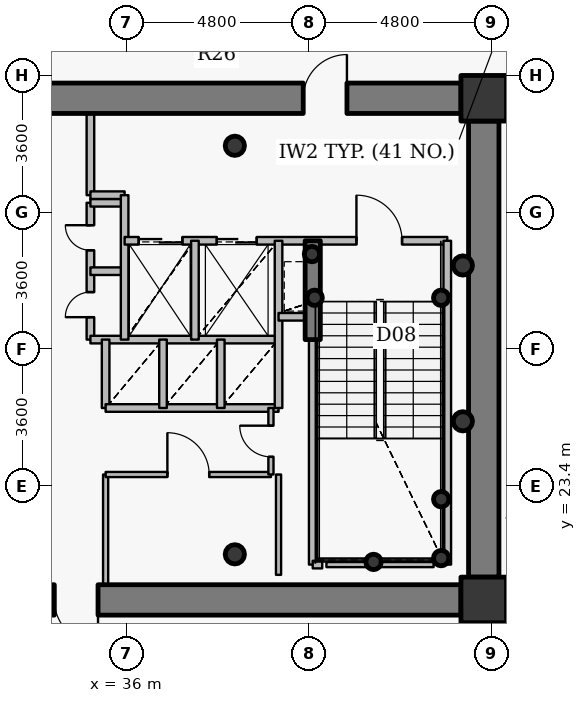
"""IFC4 building model, lengths in metres.
Left out: names, types, materials, properties, quantities, classifications, styles, units other than length and angle.
Written with IfcOpenShell. Run it as: python <this file> out.ifc"""

import sys

from ifc_helpers import new_model, si_unit, direction, frame, frame_2d, origin, origin_2d, place, context, subcontext, project, spatial, rectangle, hollow_circle, extrude, source, transform, mapped, element, fill, save


model = new_model("IFC4")
c1 = context("Model", 3, precision=1e-05, world=origin(), true_north=direction((0.0, 1.0)))
c2 = subcontext(c1, "Body", "Model", "MODEL_VIEW")
j1 = project(units=[si_unit("LENGTHUNIT", "METRE"), si_unit("PLANEANGLEUNIT", "RADIAN")], contexts=[c1])
p1 = place(None, origin())
s1 = spatial("IfcSite", under=j1, at=p1, CompositionType="ELEMENT")
p2 = place(p1, origin())
s2 = spatial("IfcBuilding", under=s1, at=p2, CompositionType="ELEMENT")
p3 = place(p2, frame((0.0, 0.0, 174.9)))
s3 = spatial("IfcBuildingStorey", under=s2, at=p3, CompositionType="ELEMENT", Elevation=174.9)
for number, where, z_axis, x_axis in (
    (1, (45.4, 20.4, 0.0), (0.0, 0.0, 1.0), (1.0, 0.0, 0.0)),
    (2, (45.4, 33.6, 0.0), (0.0, 0.0, 1.0), (1.0, 0.0, 0.0)),
):
    element("IfcColumn", number, at=place(p3, frame(where, z_axis=z_axis, x_axis=x_axis)), inside=s3, PredefinedType="COLUMN", context=c2, shape_type="SweptSolid", body=[
        extrude(rectangle(XDim=1.2, YDim=1.2, at=origin_2d()), origin(), (0.0, 0.0, 1.0), 3.75),
    ])
for number, where, z_axis, x_axis in (
    (3, (38.85, 21.6, 0.0), (0.0, 0.0, 1.0), (1.0, 0.0, 0.0)),
    (4, (38.85, 32.35, 0.0), (0.0, 0.0, 1.0), (1.0, 0.0, 0.0)),
):
    element("IfcColumn", number, at=place(p3, frame(where, z_axis=z_axis, x_axis=x_axis)), inside=s3, PredefinedType="COLUMN", context=c2, shape_type="SweptSolid", body=[
        extrude(hollow_circle(Radius=0.254, WallThickness=0.02, at=origin_2d()), origin(), (0.0, 0.0, 1.0), 3.75),
    ])
for number, where, z_axis, x_axis in (
    (5, (44.28, 21.5, 0.0), (0.0, 0.0, 1.0), (1.0, 0.0, 0.0)),
    (6, (44.28, 23.05, 0.0), (0.0, 0.0, 1.0), (1.0, 0.0, 0.0)),
    (7, (42.5, 21.4, 0.0), (0.0, 0.0, 1.0), (1.0, 0.0, 0.0)),
    (8, (40.95, 28.35, 0.0), (0.0, 0.0, 1.0), (1.0, 0.0, 0.0)),
    (9, (44.28, 28.35, 0.0), (0.0, 0.0, 1.0), (1.0, 0.0, 0.0)),
    (10, (40.88, 29.5, 0.0), (0.0, 0.0, 1.0), (1.0, 0.0, 0.0)),
):
    element("IfcColumn", number, at=place(p3, frame(where, z_axis=z_axis, x_axis=x_axis)), inside=s3, PredefinedType="COLUMN", context=c2, shape_type="SweptSolid", body=[
        extrude(hollow_circle(Radius=0.203, WallThickness=0.016, at=origin_2d()), origin(), (0.0, 0.0, 1.0), 3.75),
    ])
p4 = place(p3, frame((27.2, 33.6, 0.0), z_axis=(0.0, 0.0, 1.0), x_axis=(1.0, 0.0, 0.0)))
e11 = element("IfcWall", 11, at=p4, inside=s3, PredefinedType="SHEAR", context=c2, shape_type="SweptSolid", body=[
    extrude(rectangle(XDim=17.6, YDim=0.8, at=frame_2d((8.8, 0.0))), origin(), (0.0, 0.0, 1.0), 2.95),
])
p5 = place(p4, frame((13.45, 0.0, 0.0)))
e12 = element("IfcOpeningElement", 12, at=p5, cuts=e11, PredefinedType="OPENING", context=c2, shape_type="SweptSolid", body=[
    extrude(rectangle(XDim=1.15, YDim=2.15, at=origin_2d()), frame((0.575, 0.41, 1.075), z_axis=(0.0, -1.0, 0.0), x_axis=(1.0, 0.0, 0.0)), (0.0, 0.0, 1.0), 0.82),
])
p6 = place(p3, frame((45.4, 33.0, 0.0), z_axis=(0.0, 0.0, 1.0), x_axis=(0.0, -1.0, 0.0)))
e13 = element("IfcWall", 13, at=p6, inside=s3, PredefinedType="SHEAR", context=c2, shape_type="SweptSolid", body=[
    extrude(rectangle(XDim=12.0, YDim=0.8, at=frame_2d((6.0, 0.0))), origin(), (0.0, 0.0, 1.0), 2.95),
])
p7 = place(p3, frame((44.8, 20.4, 0.0), z_axis=(0.0, 0.0, 1.0), x_axis=(-1.0, 0.0, 0.0)))
e14 = element("IfcWall", 14, at=p7, inside=s3, PredefinedType="SHEAR", context=c2, shape_type="SweptSolid", body=[
    extrude(rectangle(XDim=17.6, YDim=0.8, at=frame_2d((8.8, 0.0))), origin(), (0.0, 0.0, 1.0), 2.95),
])
p8 = place(p7, frame((9.55, 0.0, 0.0)))
e15 = element("IfcOpeningElement", 15, at=p8, cuts=e14, PredefinedType="OPENING", context=c2, shape_type="SweptSolid", body=[
    extrude(rectangle(XDim=1.15, YDim=2.15, at=origin_2d()), frame((0.575, 0.41, 1.075), z_axis=(0.0, -1.0, 0.0), x_axis=(1.0, 0.0, 0.0)), (0.0, 0.0, 1.0), 0.82),
])
p9 = place(p3, frame((40.9, 27.25, 0.0), z_axis=(0.0, 0.0, 1.0), x_axis=(0.0, 1.0, 0.0)))
e16 = element("IfcWall", 16, at=p9, inside=s3, PredefinedType="SHEAR", context=c2, shape_type="SweptSolid", body=[
    extrude(rectangle(XDim=2.6, YDim=0.4, at=frame_2d((1.3, 0.0))), origin(), (0.0, 0.0, 1.0), 3.1),
])
for number, where, z_axis, x_axis in (
    (17, (44.85, 25.1, 0.0), (0.0, 0.0, 1.0), (1.0, 0.0, 0.0)),
    (18, (44.85, 29.2, 0.0), (0.0, 0.0, 1.0), (1.0, 0.0, 0.0)),
):
    element("IfcColumn", number, at=place(p3, frame(where, z_axis=z_axis, x_axis=x_axis)), inside=s3, PredefinedType="COLUMN", context=c2, shape_type="SweptSolid", body=[
        extrude(hollow_circle(Radius=0.254, WallThickness=0.02, at=origin_2d()), origin(), (0.0, 0.0, 1.0), 3.75),
    ])
p10 = place(p3, frame((35.05, 27.25, 0.0), z_axis=(0.0, 0.0, 1.0), x_axis=(0.0, 1.0, 0.0)))
e19 = element("IfcWall", 19, at=p10, inside=s3, PredefinedType="PARTITIONING", context=c2, shape_type="SweptSolid", body=[
    extrude(rectangle(XDim=3.6, YDim=0.2, at=frame_2d((1.8, 0.0))), origin(), (0.0, 0.0, 1.0), 3.5),
])
p11 = place(p10, frame((0.59, 0.0, 0.0)))
e20 = element("IfcOpeningElement", 20, at=p11, cuts=e19, PredefinedType="OPENING", context=c2, shape_type="SweptSolid", body=[
    extrude(rectangle(XDim=0.66, YDim=2.05, at=origin_2d()), frame((0.33, 0.11, 1.025), z_axis=(0.0, -1.0, 0.0), x_axis=(1.0, 0.0, 0.0)), (0.0, 0.0, 1.0), 0.22),
])
p12 = place(p10, frame((2.35, 0.0, 0.0)))
e21 = element("IfcOpeningElement", 21, at=p12, cuts=e19, PredefinedType="OPENING", context=c2, shape_type="SweptSolid", body=[
    extrude(rectangle(XDim=0.66, YDim=2.05, at=origin_2d()), frame((0.33, 0.11, 1.025), z_axis=(0.0, -1.0, 0.0), x_axis=(1.0, 0.0, 0.0)), (0.0, 0.0, 1.0), 0.22),
])
p13 = place(p3, frame((35.05, 27.25, 0.0), z_axis=(0.0, 0.0, 1.0), x_axis=(1.0, 0.0, 0.0)))
e22 = element("IfcWall", 22, at=p13, inside=s3, PredefinedType="PARTITIONING", context=c2, shape_type="SweptSolid", body=[
    extrude(rectangle(XDim=4.95, YDim=0.2, at=frame_2d((2.475, 0.0))), origin(), (0.0, 0.0, 1.0), 3.085),
])
for number, where, z_axis, x_axis in (
    (23, (35.05, 29.05, 0.0), (0.0, 0.0, 1.0), (1.0, 0.0, 0.0)),
    (24, (35.05, 30.85, 0.0), (0.0, 0.0, 1.0), (1.0, 0.0, 0.0)),
):
    element("IfcWall", number, at=place(p3, frame(where, z_axis=z_axis, x_axis=x_axis)), inside=s3, PredefinedType="PARTITIONING", context=c2, shape_type="SweptSolid", body=[
        extrude(rectangle(XDim=0.9, YDim=0.2, at=frame_2d((0.45, 0.0))), origin(), (0.0, 0.0, 1.0), 3.5),
    ])
p14 = place(p3, frame((35.05, 31.05, 0.0), z_axis=(0.0, 0.0, 1.0), x_axis=(0.0, 1.0, 0.0)))
e25 = element("IfcWall", 25, at=p14, inside=s3, PredefinedType="PARTITIONING", context=c2, shape_type="SweptSolid", body=[
    extrude(rectangle(XDim=2.15, YDim=0.2, at=frame_2d((1.075, 0.0))), origin(), (0.0, 0.0, 1.0), 3.085),
])
p15 = place(p3, frame((35.05, 31.05, 0.0), z_axis=(0.0, 0.0, 1.0), x_axis=(1.0, 0.0, 0.0)))
e26 = element("IfcWall", 26, at=p15, inside=s3, PredefinedType="PARTITIONING", context=c2, shape_type="SweptSolid", body=[
    extrude(rectangle(XDim=0.9, YDim=0.2, at=frame_2d((0.45, 0.0))), origin(), (0.0, 0.0, 1.0), 3.5),
])
p16 = place(p3, frame((35.45, 20.8, 0.0), z_axis=(0.0, 0.0, 1.0), x_axis=(0.0, 1.0, 0.0)))
e27 = element("IfcWall", 27, at=p16, inside=s3, PredefinedType="PARTITIONING", context=c2, shape_type="SweptSolid", body=[
    extrude(rectangle(XDim=2.9, YDim=0.135, at=frame_2d((1.45, 0.0))), origin(), (0.0, 0.0, 1.0), 3.085),
])
p17 = place(p3, frame((35.45, 23.7, 0.0), z_axis=(0.0, 0.0, 1.0), x_axis=(1.0, 0.0, 0.0)))
e28 = element("IfcWall", 28, at=p17, inside=s3, PredefinedType="PARTITIONING", context=c2, shape_type="SweptSolid", body=[
    extrude(rectangle(XDim=4.35, YDim=0.135, at=frame_2d((2.175, 0.0))), origin(), (0.0, 0.0, 1.0), 3.085),
])
p18 = place(p17, frame((1.625, 0.0, 0.0)))
e29 = element("IfcOpeningElement", 29, at=p18, cuts=e28, PredefinedType="OPENING", context=c2, shape_type="SweptSolid", body=[
    extrude(rectangle(XDim=1.1, YDim=2.15, at=origin_2d()), frame((0.55, 0.078, 1.075), z_axis=(0.0, -1.0, 0.0), x_axis=(1.0, 0.0, 0.0)), (0.0, 0.0, 1.0), 0.155),
])
p19 = place(p3, frame((35.45, 25.45, 0.0), z_axis=(0.0, 0.0, 1.0), x_axis=(0.0, 1.0, 0.0)))
e30 = element("IfcWall", 30, at=p19, inside=s3, PredefinedType="PARTITIONING", context=c2, shape_type="SweptSolid", body=[
    extrude(rectangle(XDim=1.8, YDim=0.2, at=frame_2d((0.9, 0.0))), origin(), (0.0, 0.0, 1.0), 3.5),
])
p20 = place(p3, frame((35.45, 25.45, 0.0), z_axis=(0.0, 0.0, 1.0), x_axis=(1.0, 0.0, 0.0)))
e31 = element("IfcWall", 31, at=p20, inside=s3, PredefinedType="PARTITIONING", context=c2, shape_type="SweptSolid", body=[
    extrude(rectangle(XDim=4.55, YDim=0.2, at=frame_2d((2.275, 0.0))), origin(), (0.0, 0.0, 1.0), 3.085),
])
p21 = place(p3, frame((35.95, 27.25, 0.0), z_axis=(0.0, 0.0, 1.0), x_axis=(0.0, 1.0, 0.0)))
e32 = element("IfcWall", 32, at=p21, inside=s3, PredefinedType="PARTITIONING", context=c2, shape_type="SweptSolid", body=[
    extrude(rectangle(XDim=3.8, YDim=0.2, at=frame_2d((1.9, 0.0))), origin(), (0.0, 0.0, 1.0), 3.5),
])
p22 = place(p3, frame((35.95, 29.85, 0.0), z_axis=(0.0, 0.0, 1.0), x_axis=(1.0, 0.0, 0.0)))
e33 = element("IfcWall", 33, at=p22, inside=s3, PredefinedType="PARTITIONING", context=c2, shape_type="SweptSolid", body=[
    extrude(rectangle(XDim=8.49, YDim=0.2, at=frame_2d((4.245, 0.0))), origin(), (0.0, 0.0, 1.0), 3.085),
])
p23 = place(p22, frame((6.1, 0.0, 0.0)))
e34 = element("IfcOpeningElement", 34, at=p23, cuts=e33, PredefinedType="OPENING", context=c2, shape_type="SweptSolid", body=[
    extrude(rectangle(XDim=1.2, YDim=2.15, at=origin_2d()), frame((0.6, 0.11, 1.075), z_axis=(0.0, -1.0, 0.0), x_axis=(1.0, 0.0, 0.0)), (0.0, 0.0, 1.0), 0.22),
])
p24 = place(p22, frame((0.37, 0.0, 0.0)))
e35 = element("IfcOpeningElement", 35, at=p24, cuts=e33, PredefinedType="OPENING", context=c2, shape_type="SweptSolid", body=[
    extrude(rectangle(XDim=1.15, YDim=2.15, at=origin_2d()), frame((0.575, 0.11, 1.075), z_axis=(0.0, -1.0, 0.0), x_axis=(1.0, 0.0, 0.0)), (0.0, 0.0, 1.0), 0.22),
])
p25 = place(p22, frame((2.425, 0.0, 0.0)))
e36 = element("IfcOpeningElement", 36, at=p25, cuts=e33, PredefinedType="OPENING", context=c2, shape_type="SweptSolid", body=[
    extrude(rectangle(XDim=1.05, YDim=2.15, at=origin_2d()), frame((0.525, 0.11, 1.075), z_axis=(0.0, -1.0, 0.0), x_axis=(1.0, 0.0, 0.0)), (0.0, 0.0, 1.0), 0.22),
])
p26 = place(p3, frame((36.96, 25.45, 0.0), z_axis=(0.0, 0.0, 1.0), x_axis=(0.0, 1.0, 0.0)))
e37 = element("IfcWall", 37, at=p26, inside=s3, PredefinedType="PARTITIONING", context=c2, shape_type="SweptSolid", body=[
    extrude(rectangle(XDim=1.8, YDim=0.2, at=frame_2d((0.9, 0.0))), origin(), (0.0, 0.0, 1.0), 3.5),
])
p27 = place(p3, frame((37.8, 27.25, 0.0), z_axis=(0.0, 0.0, 1.0), x_axis=(0.0, 1.0, 0.0)))
e38 = element("IfcWall", 38, at=p27, inside=s3, PredefinedType="PARTITIONING", context=c2, shape_type="SweptSolid", body=[
    extrude(rectangle(XDim=2.6, YDim=0.2, at=frame_2d((1.3, 0.0))), origin(), (0.0, 0.0, 1.0), 3.5),
])
p28 = place(p3, frame((38.48, 25.45, 0.0), z_axis=(0.0, 0.0, 1.0), x_axis=(0.0, 1.0, 0.0)))
e39 = element("IfcWall", 39, at=p28, inside=s3, PredefinedType="PARTITIONING", context=c2, shape_type="SweptSolid", body=[
    extrude(rectangle(XDim=1.8, YDim=0.2, at=frame_2d((0.9, 0.0))), origin(), (0.0, 0.0, 1.0), 3.5),
])
p29 = place(p3, frame((39.8, 23.7, 0.0), z_axis=(0.0, 0.0, 1.0), x_axis=(0.0, 1.0, 0.0)))
e40 = element("IfcWall", 40, at=p29, inside=s3, PredefinedType="PARTITIONING", context=c2, shape_type="SweptSolid", body=[
    extrude(rectangle(XDim=1.75, YDim=0.135, at=frame_2d((0.875, 0.0))), origin(), (0.0, 0.0, 1.0), 3.5),
])
p30 = place(p29, frame((0.465, 0.0, 0.0)))
e41 = element("IfcOpeningElement", 41, at=p30, cuts=e40, PredefinedType="OPENING", context=c2, shape_type="SweptSolid", body=[
    extrude(rectangle(XDim=0.82, YDim=2.1, at=origin_2d()), frame((0.41, 0.078, 1.05), z_axis=(0.0, -1.0, 0.0), x_axis=(1.0, 0.0, 0.0)), (0.0, 0.0, 1.0), 0.155),
])
p31 = place(p3, frame((40.0, 25.45, 0.0), z_axis=(0.0, 0.0, 1.0), x_axis=(0.0, 1.0, 0.0)))
e42 = element("IfcWall", 42, at=p31, inside=s3, PredefinedType="PARTITIONING", context=c2, shape_type="SweptSolid", body=[
    extrude(rectangle(XDim=4.4, YDim=0.2, at=frame_2d((2.2, 0.0))), origin(), (0.0, 0.0, 1.0), 3.5),
])
p32 = place(p3, frame((40.0, 27.85, 0.0), z_axis=(0.0, 0.0, 1.0), x_axis=(1.0, 0.0, 0.0)))
e43 = element("IfcWall", 43, at=p32, inside=s3, PredefinedType="PARTITIONING", context=c2, shape_type="SweptSolid", body=[
    extrude(rectangle(XDim=0.9, YDim=0.2, at=frame_2d((0.45, 0.0))), origin(), (0.0, 0.0, 1.0), 3.5),
])
p33 = place(p3, frame((40.9, 21.33, 0.0), z_axis=(0.0, 0.0, 1.0), x_axis=(0.0, 1.0, 0.0)))
e44 = element("IfcWall", 44, at=p33, inside=s3, PredefinedType="PARTITIONING", context=c2, shape_type="SweptSolid", body=[
    extrude(rectangle(XDim=5.91, YDim=0.2, at=frame_2d((2.955, 0.0))), origin(), (0.0, 0.0, 1.0), 3.035),
])
p34 = place(p3, frame((40.9, 21.33, 0.0), z_axis=(0.0, 0.0, 1.0), x_axis=(1.0, 0.0, 0.0)))
e45 = element("IfcWall", 45, at=p34, inside=s3, PredefinedType="PARTITIONING", context=c2, shape_type="SweptSolid", body=[
    extrude(rectangle(XDim=0.25, YDim=0.2, at=frame_2d((0.125, 0.0))), origin(), (0.0, 0.0, 1.0), 3.035),
])
p35 = place(p3, frame((44.44, 21.33, 0.0), z_axis=(0.0, 0.0, 1.0), x_axis=(0.0, 1.0, 0.0)))
e46 = element("IfcWall", 46, at=p35, inside=s3, PredefinedType="PARTITIONING", context=c2, shape_type="SweptSolid", body=[
    extrude(rectangle(XDim=8.52, YDim=0.2, at=frame_2d((4.26, 0.0))), origin(), (0.0, 0.0, 1.0), 3.5),
])
p36 = place(p3, frame((45.8, 20.05, 0.0), z_axis=(0.0, 0.0, 1.0), x_axis=(1.0, 0.0, 0.0)))
e47 = element("IfcWall", 47, at=p36, inside=s3, PredefinedType="PARTITIONING", context=c2, shape_type="SweptSolid", body=[
    extrude(rectangle(XDim=2.4, YDim=0.135, at=frame_2d((1.2, 0.0))), origin(), (0.0, 0.0, 1.0), 3.5),
])
p37 = place(p3, frame((44.08, 21.33, 0.0), z_axis=(0.0, 0.0, 1.0), x_axis=(-1.0, 0.0, 0.0)))
e48 = element("IfcWall", 48, at=p37, inside=s3, PredefinedType="PARTITIONING", context=c2, shape_type="SweptSolid", body=[
    extrude(rectangle(XDim=2.82, YDim=0.135, at=frame_2d((1.41, 0.0))), origin(), (0.0, 0.0, 1.0), 3.035),
])
p38 = place(p3, frame((40.0, 23.7, 0.0), z_axis=(0.0, 0.0, 1.0), x_axis=(0.0, -1.0, 0.0)))
e49 = element("IfcWall", 49, at=p38, inside=s3, PredefinedType="PARTITIONING", context=c2, shape_type="SweptSolid", body=[
    extrude(rectangle(XDim=2.64, YDim=0.135, at=frame_2d((1.32, 0.0))), origin(), (0.0, 0.0, 1.0), 3.035),
])
p39 = place(p3, frame((49.061, 33.95, 0.0), z_axis=(0.0, 0.0, 1.0), x_axis=(-1.0, 0.0, 0.0)))
e50 = element("IfcWall", 50, at=p39, inside=s3, PredefinedType="PARTITIONING", context=c2, shape_type="SweptSolid", body=[
    extrude(rectangle(XDim=3.261, YDim=0.135, at=frame_2d((1.63, 0.0))), origin(), (0.0, 0.0, 1.0), 3.5),
])
for number, where, z_axis, x_axis in (
    (51, (45.79, 34.0, 0.0), (0.0, 0.0, 1.0), (-1.0, 0.0, 0.0)),
    (52, (44.81, 20.0, 0.0), (0.0, 0.0, 1.0), (1.0, 0.0, 0.0)),
):
    element("IfcWall", number, at=place(p3, frame(where, z_axis=z_axis, x_axis=x_axis)), inside=s3, PredefinedType="PARTITIONING", context=c2, shape_type="SweptSolid", body=[
        extrude(rectangle(XDim=0.98, YDim=0.135, at=frame_2d((0.49, 0.0))), origin(), (0.0, 0.0, 1.0), 2.935),
    ])
p40 = place(p3, frame((45.8, 20.377, 0.0), z_axis=(0.0, 0.0, 1.0), x_axis=(0.0, 1.0, 0.0)))
e53 = element("IfcWall", 53, at=p40, inside=s3, PredefinedType="PARTITIONING", context=c2, shape_type="SweptSolid", body=[
    extrude(rectangle(XDim=0.613, YDim=0.135, at=frame_2d((0.306, 0.0))), origin(), (0.0, 0.0, 1.0), 3.5),
])
m1 = source(origin(), c2, "Body", "SweptSolid", [
    extrude(rectangle(XDim=1.15, YDim=2.15, at=origin_2d()), frame((0.575, 0.025, 1.075), z_axis=(0.0, -1.0, 0.0), x_axis=(1.0, 0.0, 0.0)), (0.0, 0.0, 1.0), 0.05),
])
p41 = place(p5, origin())
e54 = element("IfcDoor", 54, at=p41, inside=s3, OperationType="SINGLE_SWING_RIGHT", PredefinedType="DOOR", context=c2, shape_type="MappedRepresentation", body=[
    mapped(m1, transform((0.0, 0.0, 0.0), x_axis=(1.0, 0.0, 0.0), y_axis=(0.0, 1.0, 0.0), z_axis=(0.0, 0.0, 1.0), scale=1.0)),
])
fill(e12, e54)
p42 = place(p8, origin())
e55 = element("IfcDoor", 55, at=p42, inside=s3, OperationType="SINGLE_SWING_LEFT", PredefinedType="DOOR", context=c2, shape_type="MappedRepresentation", body=[
    mapped(m1, transform((0.0, 0.0, 0.0), x_axis=(1.0, 0.0, 0.0), y_axis=(0.0, 1.0, 0.0), z_axis=(0.0, 0.0, 1.0), scale=1.0)),
])
fill(e15, e55)
m2 = source(origin(), c2, "Body", "SweptSolid", [
    extrude(rectangle(XDim=1.2, YDim=2.15, at=origin_2d()), frame((0.6, 0.025, 1.075), z_axis=(0.0, -1.0, 0.0), x_axis=(1.0, 0.0, 0.0)), (0.0, 0.0, 1.0), 0.05),
])
p43 = place(p23, origin())
e56 = element("IfcDoor", 56, at=p43, inside=s3, OperationType="SINGLE_SWING_LEFT", PredefinedType="DOOR", context=c2, shape_type="MappedRepresentation", body=[
    mapped(m2, transform((0.0, 0.0, 0.0), x_axis=(1.0, 0.0, 0.0), y_axis=(0.0, 1.0, 0.0), z_axis=(0.0, 0.0, 1.0), scale=1.0)),
])
fill(e34, e56)
m3 = source(origin(), c2, "Body", "SweptSolid", [
    extrude(rectangle(XDim=1.15, YDim=2.15, at=origin_2d()), frame((0.575, 0.025, 1.075), z_axis=(0.0, -1.0, 0.0), x_axis=(1.0, 0.0, 0.0)), (0.0, 0.0, 1.0), 0.05),
])
p44 = place(p24, origin())
e57 = element("IfcDoor", 57, at=p44, inside=s3, OperationType="DOUBLE_DOOR_SLIDING", PredefinedType="USERDEFINED", context=c2, shape_type="MappedRepresentation", body=[
    mapped(m3, transform((0.0, 0.0, 0.0), x_axis=(1.0, 0.0, 0.0), y_axis=(0.0, 1.0, 0.0), z_axis=(0.0, 0.0, 1.0), scale=1.0)),
])
fill(e35, e57)
m4 = source(origin(), c2, "Body", "SweptSolid", [
    extrude(rectangle(XDim=1.05, YDim=2.15, at=origin_2d()), frame((0.525, 0.025, 1.075), z_axis=(0.0, -1.0, 0.0), x_axis=(1.0, 0.0, 0.0)), (0.0, 0.0, 1.0), 0.05),
])
p45 = place(p25, origin())
e58 = element("IfcDoor", 58, at=p45, inside=s3, OperationType="DOUBLE_DOOR_SLIDING", PredefinedType="USERDEFINED", context=c2, shape_type="MappedRepresentation", body=[
    mapped(m4, transform((0.0, 0.0, 0.0), x_axis=(1.0, 0.0, 0.0), y_axis=(0.0, 1.0, 0.0), z_axis=(0.0, 0.0, 1.0), scale=1.0)),
])
fill(e36, e58)
m5 = source(origin(), c2, "Body", "SweptSolid", [
    extrude(rectangle(XDim=0.66, YDim=2.05, at=origin_2d()), frame((0.33, 0.025, 1.025), z_axis=(0.0, -1.0, 0.0), x_axis=(1.0, 0.0, 0.0)), (0.0, 0.0, 1.0), 0.05),
])
p46 = place(p11, origin())
e59 = element("IfcDoor", 59, at=p46, inside=s3, OperationType="SINGLE_SWING_LEFT", PredefinedType="USERDEFINED", context=c2, shape_type="MappedRepresentation", body=[
    mapped(m5, transform((0.0, 0.0, 0.0), x_axis=(1.0, 0.0, 0.0), y_axis=(0.0, 1.0, 0.0), z_axis=(0.0, 0.0, 1.0), scale=1.0)),
])
fill(e20, e59)
p47 = place(p12, origin())
e60 = element("IfcDoor", 60, at=p47, inside=s3, OperationType="SINGLE_SWING_RIGHT", PredefinedType="USERDEFINED", context=c2, shape_type="MappedRepresentation", body=[
    mapped(m5, transform((0.0, 0.0, 0.0), x_axis=(1.0, 0.0, 0.0), y_axis=(0.0, 1.0, 0.0), z_axis=(0.0, 0.0, 1.0), scale=1.0)),
])
fill(e21, e60)
m6 = source(origin(), c2, "Body", "SweptSolid", [
    extrude(rectangle(XDim=1.1, YDim=2.15, at=origin_2d()), frame((0.55, 0.025, 1.075), z_axis=(0.0, -1.0, 0.0), x_axis=(1.0, 0.0, 0.0)), (0.0, 0.0, 1.0), 0.05),
])
p48 = place(p18, origin())
e61 = element("IfcDoor", 61, at=p48, inside=s3, OperationType="SINGLE_SWING_LEFT", PredefinedType="DOOR", context=c2, shape_type="MappedRepresentation", body=[
    mapped(m6, transform((0.0, 0.0, 0.0), x_axis=(1.0, 0.0, 0.0), y_axis=(0.0, 1.0, 0.0), z_axis=(0.0, 0.0, 1.0), scale=1.0)),
])
fill(e29, e61)
m7 = source(origin(), c2, "Body", "SweptSolid", [
    extrude(rectangle(XDim=0.82, YDim=2.1, at=origin_2d()), frame((0.41, 0.025, 1.05), z_axis=(0.0, -1.0, 0.0), x_axis=(1.0, 0.0, 0.0)), (0.0, 0.0, 1.0), 0.05),
])
p49 = place(p30, origin())
e62 = element("IfcDoor", 62, at=p49, inside=s3, OperationType="SINGLE_SWING_RIGHT", PredefinedType="DOOR", context=c2, shape_type="MappedRepresentation", body=[
    mapped(m7, transform((0.0, 0.0, 0.0), x_axis=(1.0, 0.0, 0.0), y_axis=(0.0, 1.0, 0.0), z_axis=(0.0, 0.0, 1.0), scale=1.0)),
])
fill(e41, e62)
save(model, sys.argv[1])
